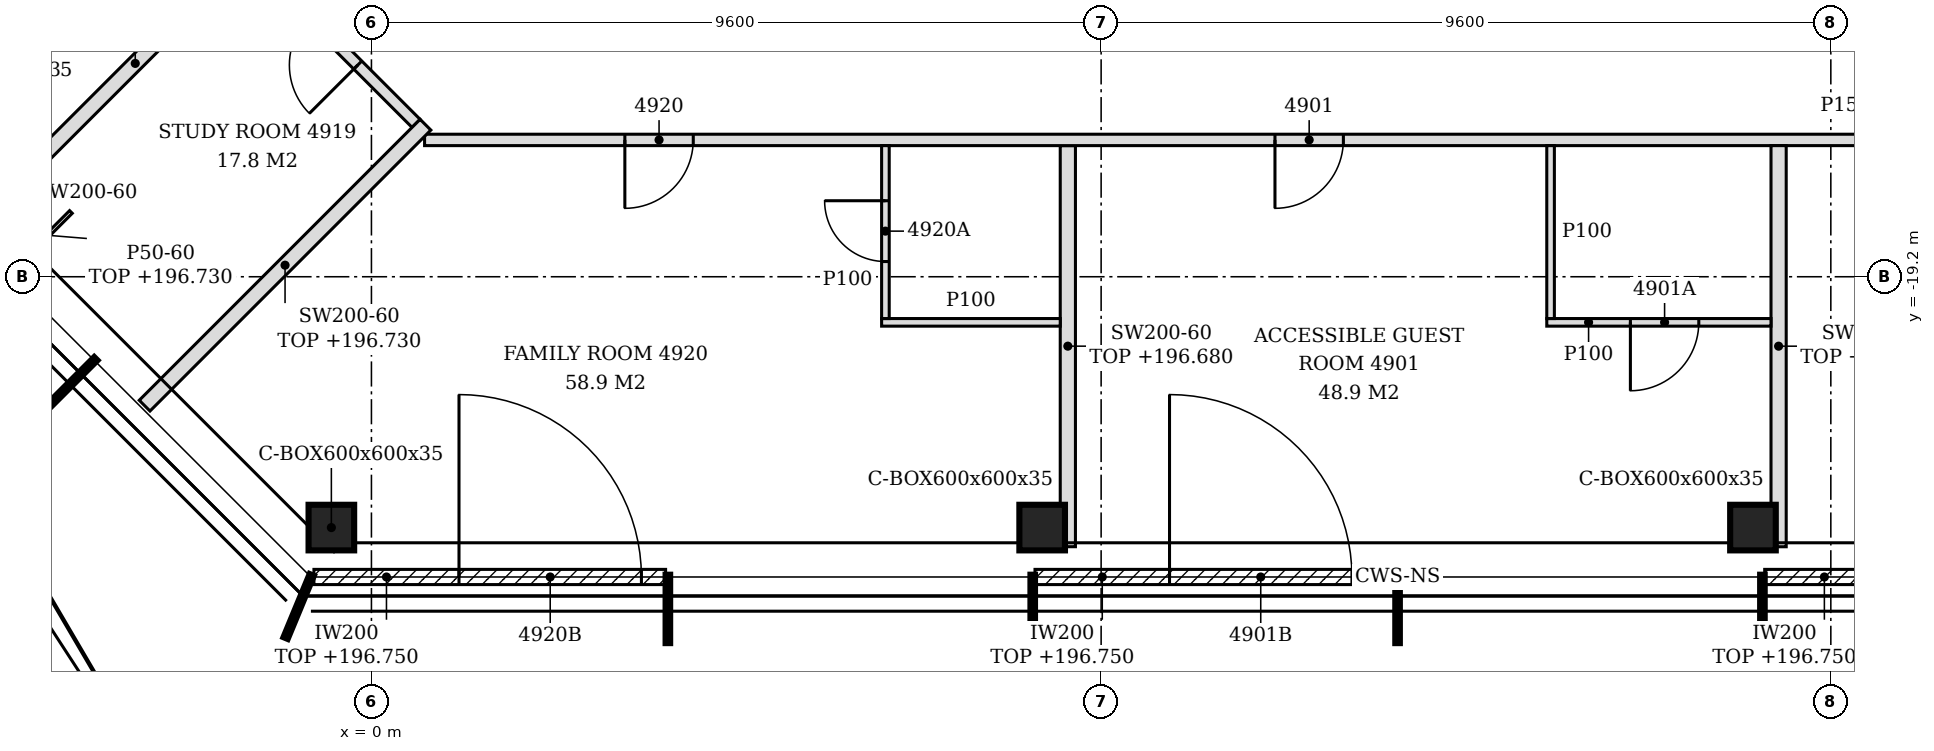
"""IFC4 building model, lengths in metres.
Left out: names, types, materials, properties, quantities, classifications, styles, units other than length and angle.
Written with IfcOpenShell. Run it as: python <this file> out.ifc"""

import sys

from ifc_helpers import new_model, si_unit, direction, frame, frame_2d, origin, origin_2d, place, context, subcontext, project, spatial, polyline, rectangle, hollow_rectangle, outline, extrude, clip, halfspace, element, fill, save


model = new_model("IFC4")
c1 = context("Model", 3, precision=1e-05, world=origin(), true_north=direction((0.0, 1.0)))
c2 = subcontext(c1, "Body", "Model", "MODEL_VIEW")
j1 = project(units=[si_unit("LENGTHUNIT", "METRE"), si_unit("PLANEANGLEUNIT", "RADIAN")], contexts=[c1])
p1 = place(None, origin())
s1 = spatial("IfcSite", under=j1, at=p1, CompositionType="ELEMENT")
p2 = place(p1, origin())
s2 = spatial("IfcBuilding", under=s1, at=p2, CompositionType="ELEMENT")
p3 = place(p2, frame((0.0, 0.0, 193.8)))
s3 = spatial("IfcBuildingStorey", under=s2, at=p3, CompositionType="ELEMENT", Elevation=193.8)
p4 = place(p3, frame((-0.527, -22.5, -0.15), z_axis=(0.182857646312, -0.121927149838, 0.975549512489), x_axis=(0.554769659169, 0.83200398152, 0.0)))
e1 = element("IfcColumn", 1, at=p4, inside=s3, PredefinedType="COLUMN", context=c2, shape_type="Clipping", body=[
    clip(clip(extrude(hollow_rectangle(XDim=0.6, YDim=0.6, WallThickness=0.035, at=origin_2d()), origin(), (0.0, 0.0, 1.0), 3.69), halfspace(frame((0.0, 0.0, 0.021), z_axis=(0.0, 0.0, 1.0), x_axis=(1.0, 0.0, 0.0)), True)), halfspace(frame((0.0, 0.0, 3.668), z_axis=(0.0, 0.0, 1.0), x_axis=(1.0, 0.0, 0.0)), False)),
])
p5 = place(p3, frame((8.824, -22.5, -0.15), z_axis=(0.18292158996, -0.12192567461, 0.97553770906), x_axis=(0.55463074681, 0.832096589761, 0.0)))
e2 = element("IfcColumn", 2, at=p5, inside=s3, PredefinedType="COLUMN", context=c2, shape_type="Clipping", body=[
    clip(clip(extrude(hollow_rectangle(XDim=0.6, YDim=0.6, WallThickness=0.035, at=origin_2d()), origin(), (0.0, 0.0, 1.0), 3.69), halfspace(frame((0.0, 0.0, 0.021), z_axis=(0.0, 0.0, 1.0), x_axis=(1.0, 0.0, 0.0)), True)), halfspace(frame((0.0, 0.0, 3.668), z_axis=(0.0, 0.0, 1.0), x_axis=(1.0, 0.0, 0.0)), False)),
])
p6 = place(p3, frame((18.176, -22.5, -0.15), z_axis=(0.182857646312, -0.121927149838, 0.975549512489), x_axis=(0.554769659169, 0.83200398152, 0.0)))
e3 = element("IfcColumn", 3, at=p6, inside=s3, PredefinedType="COLUMN", context=c2, shape_type="Clipping", body=[
    clip(clip(extrude(hollow_rectangle(XDim=0.6, YDim=0.6, WallThickness=0.035, at=origin_2d()), origin(), (0.0, 0.0, 1.0), 3.69), halfspace(frame((0.0, 0.0, 0.021), z_axis=(0.0, 0.0, 1.0), x_axis=(1.0, 0.0, 0.0)), True)), halfspace(frame((0.0, 0.0, 3.668), z_axis=(0.0, 0.0, 1.0), x_axis=(1.0, 0.0, 0.0)), False)),
])
p7 = place(p3, frame((-5.152, -17.876, -0.15), z_axis=(0.18292158996, -0.12192567461, 0.97553770906), x_axis=(0.55463074681, 0.832096589761, 0.0)))
e4 = element("IfcColumn", 4, at=p7, inside=s3, PredefinedType="COLUMN", context=c2, shape_type="Clipping", body=[
    clip(clip(extrude(hollow_rectangle(XDim=0.6, YDim=0.6, WallThickness=0.035, at=origin_2d()), origin(), (0.0, 0.0, 1.0), 3.69), halfspace(frame((0.0, 0.0, 0.021), z_axis=(0.0, 0.0, 1.0), x_axis=(1.0, 0.0, 0.0)), True)), halfspace(frame((0.0, 0.0, 3.668), z_axis=(0.0, 0.0, 1.0), x_axis=(1.0, 0.0, 0.0)), False)),
])
p8 = place(p3, frame((-0.756, -23.15, 0.0), z_axis=(0.0, 0.0, 1.0), x_axis=(1.0, 0.0, 0.0)))
e5 = element("IfcWall", 5, at=p8, inside=s3, PredefinedType="NOTDEFINED", context=c2, shape_type="SweptSolid", body=[
    extrude(rectangle(XDim=4.626, YDim=0.2, at=frame_2d((2.313, 0.0))), origin(), (0.0, 0.0, 1.0), 2.95),
])
p9 = place(p8, frame((1.908, 0.0, 0.0)))
e6 = element("IfcOpeningElement", 6, at=p9, cuts=e5, PredefinedType="OPENING", context=c2, shape_type="SweptSolid", body=[
    extrude(rectangle(XDim=2.4, YDim=2.4, at=frame_2d((1.2, 1.2))), frame((0.0, 0.11, 0.0), z_axis=(0.0, -1.0, 0.0), x_axis=(1.0, 0.0, 0.0)), (0.0, 0.0, 1.0), 0.22),
])
p10 = place(p3, frame((8.73, -23.15, 0.0), z_axis=(0.0, 0.0, 1.0), x_axis=(1.0, 0.0, 0.0)))
e7 = element("IfcWall", 7, at=p10, inside=s3, PredefinedType="NOTDEFINED", context=c2, shape_type="SweptSolid", body=[
    extrude(rectangle(XDim=4.74, YDim=0.2, at=frame_2d((2.37, 0.0))), origin(), (0.0, 0.0, 1.0), 2.95),
])
p11 = place(p10, frame((1.77, 0.0, 0.0)))
e8 = element("IfcOpeningElement", 8, at=p11, cuts=e7, PredefinedType="OPENING", context=c2, shape_type="SweptSolid", body=[
    extrude(rectangle(XDim=2.4, YDim=2.4, at=frame_2d((1.2, 1.2))), frame((0.0, 0.11, 0.0), z_axis=(0.0, -1.0, 0.0), x_axis=(1.0, 0.0, 0.0)), (0.0, 0.0, 1.0), 0.22),
])
p12 = place(p3, frame((18.33, -23.15, 0.0), z_axis=(0.0, 0.0, 1.0), x_axis=(1.0, 0.0, 0.0)))
e9 = element("IfcWall", 9, at=p12, inside=s3, PredefinedType="NOTDEFINED", context=c2, shape_type="SweptSolid", body=[
    extrude(rectangle(XDim=4.74, YDim=0.2, at=frame_2d((2.37, 0.0))), origin(), (0.0, 0.0, 1.0), 2.95),
])
p13 = place(p12, frame((1.57, 0.0, 0.0)))
e10 = element("IfcOpeningElement", 10, at=p13, cuts=e9, PredefinedType="OPENING", context=c2, shape_type="SweptSolid", body=[
    extrude(rectangle(XDim=2.4, YDim=2.4, at=frame_2d((1.2, 1.2))), frame((0.0, 0.11, 0.0), z_axis=(0.0, -1.0, 0.0), x_axis=(1.0, 0.0, 0.0)), (0.0, 0.0, 1.0), 0.22),
])
p14 = place(p3, frame((9.162, -22.752, 0.0), z_axis=(0.0, 0.0, 1.0), x_axis=(0.0, 1.0, 0.0)))
e11 = element("IfcWall", 11, at=p14, inside=s3, PredefinedType="PARTITIONING", context=c2, shape_type="SweptSolid", body=[
    extrude(outline(polyline([(0.454, 0.0), (5.277, 0.0), (5.277, 0.863), (5.277, 1.725), (5.277, 2.587), (5.277, 2.88), (0.218, 2.88), (0.33, 2.587), (0.438, 1.725), (0.454, 0.863), (0.454, 0.0)])), frame((0.0, 0.1, 0.0), z_axis=(0.0, -1.0, 0.0), x_axis=(1.0, 0.0, 0.0)), (0.0, 0.0, 1.0), 0.2),
])
p15 = place(p3, frame((18.513, -22.752, 0.0), z_axis=(0.0, 0.0, 1.0), x_axis=(0.0, 1.0, 0.0)))
e12 = element("IfcWall", 12, at=p15, inside=s3, PredefinedType="PARTITIONING", context=c2, shape_type="SweptSolid", body=[
    extrude(outline(polyline([(0.455, 0.0), (5.277, 0.0), (5.277, 0.863), (5.277, 1.725), (5.277, 2.587), (5.277, 2.88), (0.218, 2.88), (0.33, 2.587), (0.438, 1.725), (0.455, 0.863), (0.455, 0.0)])), frame((0.0, 0.1, 0.0), z_axis=(0.0, -1.0, 0.0), x_axis=(1.0, 0.0, 0.0)), (0.0, 0.0, 1.0), 0.2),
])
p16 = place(p3, frame((-2.984, -20.896, 0.0), z_axis=(0.0, 0.0, 1.0), x_axis=(0.707013347416, 0.707200202612, 0.0)))
e13 = element("IfcWall", 13, at=p16, inside=s3, PredefinedType="PARTITIONING", context=c2, shape_type="SweptSolid", body=[
    extrude(rectangle(XDim=5.226, YDim=0.2, at=frame_2d((2.613, 0.0))), origin(), (0.0, 0.0, 1.0), 2.93),
])
p17 = place(p3, frame((6.712, -19.8, 0.0), z_axis=(0.0, 0.0, 1.0), x_axis=(1.0, 0.0, 0.0)))
e14 = element("IfcWall", 14, at=p17, inside=s3, PredefinedType="PARTITIONING", context=c2, shape_type="SweptSolid", body=[
    extrude(outline(polyline([(0.0, 0.0), (2.35, 0.0), (2.35, 3.45), (0.638, 3.45), (0.636, 2.73), (0.338, 2.73), (0.336, 3.45), (0.0, 3.45), (0.0, 0.0)])), frame((0.0, 0.05, 0.0), z_axis=(0.0, -1.0, 0.0), x_axis=(1.0, 0.0, 0.0)), (0.0, 0.0, 1.0), 0.1),
])
p18 = place(p3, frame((6.762, -19.75, 0.0), z_axis=(0.0, 0.0, 1.0), x_axis=(0.0, 1.0, 0.0)))
e15 = element("IfcWall", 15, at=p18, inside=s3, PredefinedType="PARTITIONING", context=c2, shape_type="SweptSolid", body=[
    extrude(outline(polyline([(0.0, 0.0), (2.275, 0.0), (2.275, 3.45), (0.8, 3.45), (0.798, 2.93), (0.6, 2.93), (0.598, 3.45), (0.0, 3.45), (0.0, 0.0)])), frame((0.0, 0.05, 0.0), z_axis=(0.0, -1.0, 0.0), x_axis=(1.0, 0.0, 0.0)), (0.0, 0.0, 1.0), 0.1),
])
p19 = place(p18, frame((0.75, 0.0, 0.0)))
e16 = element("IfcOpeningElement", 16, at=p19, cuts=e15, PredefinedType="OPENING", context=c2, shape_type="SweptSolid", body=[
    extrude(rectangle(XDim=0.8, YDim=2.1, at=frame_2d((0.4, 1.05))), frame((0.0, 0.06, 0.0), z_axis=(0.0, -1.0, 0.0), x_axis=(1.0, 0.0, 0.0)), (0.0, 0.0, 1.0), 0.12),
])
p20 = place(p3, frame((15.463, -19.8, 0.0), z_axis=(0.0, 0.0, 1.0), x_axis=(1.0, 0.0, 0.0)))
e17 = element("IfcWall", 17, at=p20, inside=s3, PredefinedType="PARTITIONING", context=c2, shape_type="SweptSolid", body=[
    extrude(rectangle(XDim=2.95, YDim=0.1, at=frame_2d((1.475, 0.0))), origin(), (0.0, 0.0, 1.0), 3.45),
])
p21 = place(p20, frame((1.1, 0.0, 0.0)))
e18 = element("IfcOpeningElement", 18, at=p21, cuts=e17, PredefinedType="OPENING", context=c2, shape_type="SweptSolid", body=[
    extrude(rectangle(XDim=0.9, YDim=2.1, at=frame_2d((0.45, 1.05))), frame((0.0, 0.06, 0.0), z_axis=(0.0, -1.0, 0.0), x_axis=(1.0, 0.0, 0.0)), (0.0, 0.0, 1.0), 0.12),
])
p22 = place(p3, frame((15.513, -19.75, 0.0), z_axis=(0.0, 0.0, 1.0), x_axis=(0.0, 1.0, 0.0)))
e19 = element("IfcWall", 19, at=p22, inside=s3, PredefinedType="PARTITIONING", context=c2, shape_type="SweptSolid", body=[
    extrude(outline(polyline([(0.0, 0.0), (2.275, 0.0), (2.275, 3.45), (0.805, 3.45), (0.803, 2.88), (0.595, 2.88), (0.593, 3.45), (0.0, 3.45), (0.0, 0.0)])), frame((0.0, 0.05, 0.0), z_axis=(0.0, -1.0, 0.0), x_axis=(1.0, 0.0, 0.0)), (0.0, 0.0, 1.0), 0.1),
])
p23 = place(p3, frame((-4.507, -17.793, 0.0), z_axis=(0.0, 0.0, 1.0), x_axis=(0.707106781187, 0.707106781187, 0.0)))
e20 = element("IfcWall", 20, at=p23, inside=s3, PredefinedType="PARTITIONING", context=c2, shape_type="SweptSolid", body=[
    extrude(rectangle(XDim=3.96, YDim=0.2, at=frame_2d((1.98, 0.0))), origin(), (0.0, 0.0, 1.0), 3.45),
])
p24 = place(p3, frame((0.699, -17.4, 0.0), z_axis=(0.0, 0.0, 1.0), x_axis=(1.0, 0.0, 0.0)))
e21 = element("IfcWall", 21, at=p24, inside=s3, PredefinedType="PARTITIONING", context=c2, shape_type="SweptSolid", body=[
    extrude(outline(polyline([(0.0, 0.0), (24.822, 0.0), (24.822, 3.45), (18.651, 3.45), (18.649, 2.73), (18.351, 2.73), (18.349, 3.45), (6.651, 3.45), (6.649, 2.73), (6.351, 2.73), (6.349, 3.45), (0.0, 3.45), (0.0, 0.0)])), frame((0.0, 0.075, 0.0), z_axis=(0.0, -1.0, 0.0), x_axis=(1.0, 0.0, 0.0)), (0.0, 0.0, 1.0), 0.15),
])
p25 = place(p24, frame((11.188, 0.0, 0.0)))
e22 = element("IfcOpeningElement", 22, at=p25, cuts=e21, PredefinedType="OPENING", context=c2, shape_type="SweptSolid", body=[
    extrude(rectangle(XDim=0.9, YDim=2.1, at=frame_2d((0.45, 1.05))), frame((0.0, 0.085, 0.0), z_axis=(0.0, -1.0, 0.0), x_axis=(1.0, 0.0, 0.0)), (0.0, 0.0, 1.0), 0.17),
])
p26 = place(p24, frame((2.635, 0.0, 0.0)))
e23 = element("IfcOpeningElement", 23, at=p26, cuts=e21, PredefinedType="OPENING", context=c2, shape_type="SweptSolid", body=[
    extrude(rectangle(XDim=0.9, YDim=2.1, at=frame_2d((0.45, 1.05))), frame((0.0, 0.085, 0.0), z_axis=(0.0, -1.0, 0.0), x_axis=(1.0, 0.0, 0.0)), (0.0, 0.0, 1.0), 0.17),
])
p27 = place(p3, frame((0.587, -17.182, 0.0), z_axis=(0.0, 0.0, 1.0), x_axis=(-0.706952760983, 0.707260767849, 0.0)))
e24 = element("IfcWall", 24, at=p27, inside=s3, PredefinedType="PARTITIONING", context=c2, shape_type="SweptSolid", body=[
    extrude(rectangle(XDim=3.171, YDim=0.15, at=frame_2d((1.585, 0.0))), origin(), (0.0, 0.0, 1.0), 3.45),
])
p28 = place(p27, frame((1.085, 0.0, 0.0)))
e25 = element("IfcOpeningElement", 25, at=p28, cuts=e24, PredefinedType="OPENING", context=c2, shape_type="SweptSolid", body=[
    extrude(rectangle(XDim=0.9, YDim=2.1, at=frame_2d((0.45, 1.05))), frame((0.0, 0.085, 0.0), z_axis=(0.0, -1.0, 0.0), x_axis=(1.0, 0.0, 0.0)), (0.0, 0.0, 1.0), 0.17),
])
p29 = place(p3, frame((-7.6, -16.262, 0.0), z_axis=(0.0, 0.0, 1.0), x_axis=(0.707106781187, 0.707106781187, 0.0)))
e26 = element("IfcWall", 26, at=p29, inside=s3, PredefinedType="PARTITIONING", context=c2, shape_type="SweptSolid", body=[
    extrude(rectangle(XDim=5.064, YDim=0.2, at=frame_2d((2.532, 0.0))), origin(), (0.0, 0.0, 1.0), 2.63),
])
p30 = place(p3, frame((-4.567, -18.961, 0.0), z_axis=(0.0, 0.0, 1.0), x_axis=(0.707106781187, 0.707106781187, 0.0)))
e27 = element("IfcWall", 27, at=p30, inside=s3, PredefinedType="PARTITIONING", context=c2, shape_type="SweptSolid", body=[
    extrude(rectangle(XDim=0.868, YDim=0.05, at=frame_2d((0.434, 0.0))), origin(), (0.0, 0.0, 1.0), 2.93),
])
p31 = place(p9, origin())
e28 = element("IfcDoor", 28, at=p31, inside=s3, OperationType="SINGLE_SWING_LEFT", PredefinedType="DOOR", context=c2, shape_type="SweptSolid", body=[
    extrude(rectangle(XDim=2.4, YDim=2.4, at=frame_2d((1.2, 1.2))), frame((0.0, 0.025, 0.0), z_axis=(0.0, -1.0, 0.0), x_axis=(1.0, 0.0, 0.0)), (0.0, 0.0, 1.0), 0.05),
])
fill(e6, e28)
p32 = place(p11, origin())
e29 = element("IfcDoor", 29, at=p32, inside=s3, OperationType="SINGLE_SWING_LEFT", PredefinedType="DOOR", context=c2, shape_type="SweptSolid", body=[
    extrude(rectangle(XDim=2.4, YDim=2.4, at=frame_2d((1.2, 1.2))), frame((0.0, 0.025, 0.0), z_axis=(0.0, -1.0, 0.0), x_axis=(1.0, 0.0, 0.0)), (0.0, 0.0, 1.0), 0.05),
])
fill(e8, e29)
p33 = place(p25, frame((0.9, 0.0, 0.0), z_axis=(0.0, 0.0, 1.0), x_axis=(-1.0, 0.0, 0.0)))
e30 = element("IfcDoor", 30, at=p33, inside=s3, OperationType="SINGLE_SWING_RIGHT", PredefinedType="DOOR", context=c2, shape_type="SweptSolid", body=[
    extrude(rectangle(XDim=0.9, YDim=2.1, at=frame_2d((0.45, 1.05))), frame((0.0, 0.025, 0.0), z_axis=(0.0, -1.0, 0.0), x_axis=(1.0, 0.0, 0.0)), (0.0, 0.0, 1.0), 0.05),
])
fill(e22, e30)
p34 = place(p21, frame((0.9, 0.0, 0.0), z_axis=(0.0, 0.0, 1.0), x_axis=(-1.0, 0.0, 0.0)))
e31 = element("IfcDoor", 31, at=p34, inside=s3, OperationType="SINGLE_SWING_RIGHT", PredefinedType="DOOR", context=c2, shape_type="SweptSolid", body=[
    extrude(rectangle(XDim=0.9, YDim=2.1, at=frame_2d((0.45, 1.05))), frame((0.0, 0.025, 0.0), z_axis=(0.0, -1.0, 0.0), x_axis=(1.0, 0.0, 0.0)), (0.0, 0.0, 1.0), 0.05),
])
fill(e18, e31)
p35 = place(p28, origin())
e32 = element("IfcDoor", 32, at=p35, inside=s3, OperationType="SINGLE_SWING_LEFT", PredefinedType="DOOR", context=c2, shape_type="SweptSolid", body=[
    extrude(rectangle(XDim=0.9, YDim=2.1, at=frame_2d((0.45, 1.05))), frame((0.0, 0.025, 0.0), z_axis=(0.0, -1.0, 0.0), x_axis=(1.0, 0.0, 0.0)), (0.0, 0.0, 1.0), 0.05),
])
fill(e25, e32)
p36 = place(p26, frame((0.9, 0.0, 0.0), z_axis=(0.0, 0.0, 1.0), x_axis=(-1.0, 0.0, 0.0)))
e33 = element("IfcDoor", 33, at=p36, inside=s3, OperationType="SINGLE_SWING_RIGHT", PredefinedType="DOOR", context=c2, shape_type="SweptSolid", body=[
    extrude(rectangle(XDim=0.9, YDim=2.1, at=frame_2d((0.45, 1.05))), frame((0.0, 0.025, 0.0), z_axis=(0.0, -1.0, 0.0), x_axis=(1.0, 0.0, 0.0)), (0.0, 0.0, 1.0), 0.05),
])
fill(e23, e33)
p37 = place(p19, origin())
e34 = element("IfcDoor", 34, at=p37, inside=s3, OperationType="SINGLE_SWING_RIGHT", PredefinedType="DOOR", context=c2, shape_type="SweptSolid", body=[
    extrude(rectangle(XDim=0.8, YDim=2.1, at=frame_2d((0.4, 1.05))), frame((0.0, 0.025, 0.0), z_axis=(0.0, -1.0, 0.0), x_axis=(1.0, 0.0, 0.0)), (0.0, 0.0, 1.0), 0.05),
])
fill(e16, e34)
save(model, sys.argv[1])
